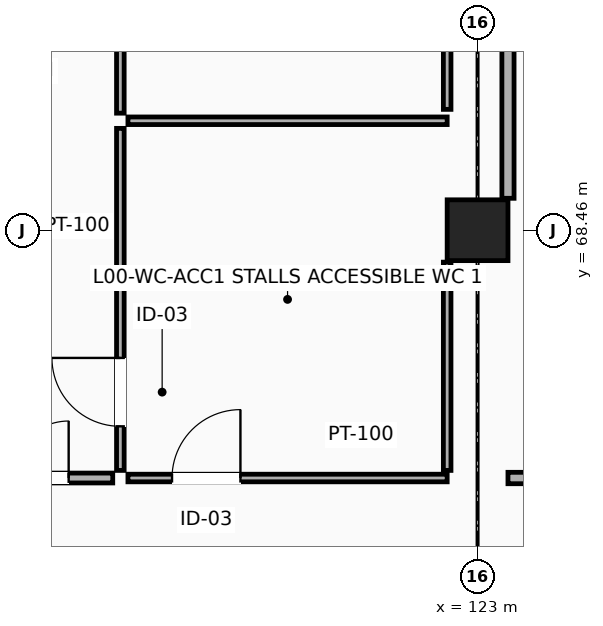
"""IFC4 building model, lengths in metres.
Left out: names, types, materials, properties, quantities, classifications, styles, units other than length and angle.
Written with IfcOpenShell. Run it as: python <this file> out.ifc"""

import sys

from ifc_helpers import new_model, si_unit, direction, frame, frame_2d, origin, origin_2d, place, context, subcontext, project, spatial, rectangle, extrude, element, fill, save


model = new_model("IFC4")
c1 = context("Model", 3, precision=1e-05, world=origin(), true_north=direction((0.0, 1.0)))
c2 = subcontext(c1, "Body", "Model", "MODEL_VIEW")
j1 = project(units=[si_unit("LENGTHUNIT", "METRE"), si_unit("PLANEANGLEUNIT", "RADIAN")], contexts=[c1])
p1 = place(None, origin())
s1 = spatial("IfcSite", under=j1, at=p1, CompositionType="ELEMENT")
p2 = place(p1, origin())
s2 = spatial("IfcBuilding", under=s1, at=p2, CompositionType="ELEMENT")
p3 = place(p2, origin())
s3 = spatial("IfcBuildingStorey", under=s2, at=p3, CompositionType="ELEMENT", Elevation=0.0)
p4 = place(p3, frame((123.0, 68.46, 0.0), z_axis=(0.0, 0.0, 1.0), x_axis=(1.0, 0.0, 0.0)))
e1 = element("IfcColumn", 1, at=p4, inside=s3, PredefinedType="COLUMN", context=c2, shape_type="SweptSolid", body=[
    extrude(rectangle(XDim=0.8, YDim=0.8, at=origin_2d()), origin(), (0.0, 0.0, 1.0), 5.4),
])
p5 = place(p3, frame((115.2, 65.2, 0.0), z_axis=(0.0, 0.0, 1.0), x_axis=(1.0, 0.0, 0.0)))
e2 = element("IfcWall", 2, at=p5, inside=s3, PredefinedType="PARTITIONING", context=c2, shape_type="SweptSolid", body=[
    extrude(rectangle(XDim=3.0, YDim=0.13, at=frame_2d((1.5, 0.0))), origin(), (0.0, 0.0, 1.0), 4.787),
])
p6 = place(p5, frame((0.92, 0.0, 0.0)))
e3 = element("IfcOpeningElement", 3, at=p6, cuts=e2, PredefinedType="OPENING", context=c2, shape_type="SweptSolid", body=[
    extrude(rectangle(XDim=1.5, YDim=2.2, at=frame_2d((0.75, 1.1))), frame((0.0, 0.075, 0.0), z_axis=(0.0, -1.0, 0.0), x_axis=(1.0, 0.0, 0.0)), (0.0, 0.0, 1.0), 0.15),
])
p7 = place(p3, frame((118.4, 65.2, 0.0), z_axis=(0.0, 0.0, 1.0), x_axis=(1.0, 0.0, 0.0)))
e4 = element("IfcWall", 4, at=p7, inside=s3, PredefinedType="PARTITIONING", context=c2, shape_type="SweptSolid", body=[
    extrude(rectangle(XDim=4.2, YDim=0.1, at=frame_2d((2.1, 0.0))), origin(), (0.0, 0.0, 1.0), 4.757),
])
p8 = place(p7, frame((0.58, 0.0, 0.0)))
e5 = element("IfcOpeningElement", 5, at=p8, cuts=e4, PredefinedType="OPENING", context=c2, shape_type="SweptSolid", body=[
    extrude(rectangle(XDim=0.9, YDim=2.1, at=frame_2d((0.45, 1.05))), frame((0.0, 0.06, 0.0), z_axis=(0.0, -1.0, 0.0), x_axis=(1.0, 0.0, 0.0)), (0.0, 0.0, 1.0), 0.12),
])
p9 = place(p3, frame((123.4, 65.2, 0.0), z_axis=(0.0, 0.0, 1.0), x_axis=(1.0, 0.0, 0.0)))
e6 = element("IfcWall", 6, at=p9, inside=s3, PredefinedType="MOVABLE", context=c2, shape_type="SweptSolid", body=[
    extrude(rectangle(XDim=25.0, YDim=0.15, at=frame_2d((12.5, 0.0))), origin(), (0.0, 0.0, 1.0), 4.337),
])
p10 = place(p9, frame((19.289, 0.0, 0.0)))
e7 = element("IfcOpeningElement", 7, at=p10, cuts=e6, PredefinedType="OPENING", context=c2, shape_type="SweptSolid", body=[
    extrude(rectangle(XDim=1.15, YDim=2.25, at=frame_2d((0.575, 1.125))), frame((0.0, 0.085, 0.0), z_axis=(0.0, -1.0, 0.0), x_axis=(1.0, 0.0, 0.0)), (0.0, 0.0, 1.0), 0.17),
])
p11 = place(p3, frame((118.3, 65.3, 0.0), z_axis=(0.0, 0.0, 1.0), x_axis=(0.0, 1.0, 0.0)))
e8 = element("IfcWall", 8, at=p11, inside=s3, PredefinedType="PARTITIONING", context=c2, shape_type="SweptSolid", body=[
    extrude(rectangle(XDim=4.5, YDim=0.1, at=frame_2d((2.25, 0.0))), origin(), (0.0, 0.0, 1.0), 4.137),
])
p12 = place(p11, frame((0.58, 0.0, 0.0)))
e9 = element("IfcOpeningElement", 9, at=p12, cuts=e8, PredefinedType="OPENING", context=c2, shape_type="SweptSolid", body=[
    extrude(rectangle(XDim=0.9, YDim=2.1, at=frame_2d((0.45, 1.05))), frame((0.0, 0.06, 0.0), z_axis=(0.0, -1.0, 0.0), x_axis=(1.0, 0.0, 0.0)), (0.0, 0.0, 1.0), 0.12),
])
p13 = place(p3, frame((118.3, 70.0, 0.0), z_axis=(0.0, 0.0, 1.0), x_axis=(0.0, 1.0, 0.0)))
e10 = element("IfcWall", 10, at=p13, inside=s3, PredefinedType="PARTITIONING", context=c2, shape_type="SweptSolid", body=[
    extrude(rectangle(XDim=4.5, YDim=0.1, at=frame_2d((2.25, 0.0))), origin(), (0.0, 0.0, 1.0), 5.085),
])
p14 = place(p13, frame((1.706, 0.0, 0.0)))
e11 = element("IfcOpeningElement", 11, at=p14, cuts=e10, PredefinedType="OPENING", context=c2, shape_type="SweptSolid", body=[
    extrude(rectangle(XDim=0.9, YDim=2.1, at=frame_2d((0.45, 1.05))), frame((0.0, 0.06, 0.0), z_axis=(0.0, -1.0, 0.0), x_axis=(1.0, 0.0, 0.0)), (0.0, 0.0, 1.0), 0.12),
])
p15 = place(p3, frame((118.4, 69.9, 0.0), z_axis=(0.0, 0.0, 1.0), x_axis=(1.0, 0.0, 0.0)))
e12 = element("IfcWall", 12, at=p15, inside=s3, PredefinedType="PARTITIONING", context=c2, shape_type="SweptSolid", body=[
    extrude(rectangle(XDim=4.2, YDim=0.1, at=frame_2d((2.1, 0.0))), origin(), (0.0, 0.0, 1.0), 4.727),
])
p16 = place(p3, frame((122.6, 65.3, 0.0), z_axis=(0.0, 0.0, 1.0), x_axis=(0.0, 1.0, 0.0)))
e13 = element("IfcWall", 13, at=p16, inside=s3, PredefinedType="PARTITIONING", context=c2, shape_type="SweptSolid", body=[
    extrude(rectangle(XDim=2.74, YDim=0.1, at=frame_2d((1.37, 0.0))), origin(), (0.0, 0.0, 1.0), 5.085),
])
p17 = place(p3, frame((122.6, 70.05, 0.0), z_axis=(0.0, 0.0, 1.0), x_axis=(0.0, 1.0, 0.0)))
e14 = element("IfcWall", 14, at=p17, inside=s3, PredefinedType="PARTITIONING", context=c2, shape_type="SweptSolid", body=[
    extrude(rectangle(XDim=4.45, YDim=0.1, at=frame_2d((2.225, 0.0))), origin(), (0.0, 0.0, 1.0), 5.085),
])
p18 = place(p3, frame((123.4, 68.88, 0.0), z_axis=(0.0, 0.0, 1.0), x_axis=(0.0, 1.0, 0.0)))
e15 = element("IfcWall", 15, at=p18, inside=s3, PredefinedType="PARTITIONING", context=c2, shape_type="SweptSolid", body=[
    extrude(rectangle(XDim=13.92, YDim=0.16, at=frame_2d((6.96, 0.0))), origin(), (0.0, 0.0, 1.0), 4.137),
])
p19 = place(p6, origin())
e16 = element("IfcDoor", 16, at=p19, inside=s3, OperationType="DOUBLE_DOOR_SINGLE_SWING", PredefinedType="DOOR", context=c2, shape_type="SweptSolid", body=[
    extrude(rectangle(XDim=1.5, YDim=2.2, at=frame_2d((0.75, 1.1))), frame((0.0, 0.025, 0.0), z_axis=(0.0, -1.0, 0.0), x_axis=(1.0, 0.0, 0.0)), (0.0, 0.0, 1.0), 0.05),
])
fill(e3, e16)
p20 = place(p8, origin())
e17 = element("IfcDoor", 17, at=p20, inside=s3, OperationType="SINGLE_SWING_RIGHT", PredefinedType="DOOR", context=c2, shape_type="SweptSolid", body=[
    extrude(rectangle(XDim=0.9, YDim=2.1, at=frame_2d((0.45, 1.05))), frame((0.0, 0.025, 0.0), z_axis=(0.0, -1.0, 0.0), x_axis=(1.0, 0.0, 0.0)), (0.0, 0.0, 1.0), 0.05),
])
fill(e5, e17)
p21 = place(p12, origin())
e18 = element("IfcDoor", 18, at=p21, inside=s3, OperationType="SINGLE_SWING_RIGHT", PredefinedType="DOOR", context=c2, shape_type="SweptSolid", body=[
    extrude(rectangle(XDim=0.9, YDim=2.1, at=frame_2d((0.45, 1.05))), frame((0.0, 0.025, 0.0), z_axis=(0.0, -1.0, 0.0), x_axis=(1.0, 0.0, 0.0)), (0.0, 0.0, 1.0), 0.05),
])
fill(e9, e18)
save(model, sys.argv[1])
